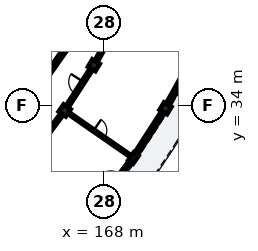
"""IFC4 building model, lengths in metres.
Left out: names, types, materials, properties, quantities, classifications, styles, units other than length and angle.
Written with IfcOpenShell. Run it as: python <this file> out.ifc"""

import sys

from ifc_helpers import new_model, si_unit, direction, frame, frame_2d, origin, origin_2d, place, context, subcontext, project, spatial, rectangle, extrude, element, fill, save


model = new_model("IFC4")
c1 = context("Model", 3, precision=1e-05, world=origin(), true_north=direction((0.0, 1.0)))
c2 = subcontext(c1, "Body", "Model", "MODEL_VIEW")
j1 = project(units=[si_unit("LENGTHUNIT", "METRE"), si_unit("PLANEANGLEUNIT", "RADIAN")], contexts=[c1])
p1 = place(None, origin())
s1 = spatial("IfcSite", under=j1, at=p1, CompositionType="ELEMENT")
p2 = place(p1, origin())
s2 = spatial("IfcBuilding", under=s1, at=p2, CompositionType="ELEMENT")
p3 = place(p2, frame((0.0, 0.0, 15.56)))
s3 = spatial("IfcBuildingStorey", under=s2, at=p3, CompositionType="ELEMENT", Elevation=15.56)
p4 = place(p3, frame((165.907, 38.366, 0.0), z_axis=(0.0, 0.0, 1.0), x_axis=(-0.573582112484, -0.819148069789, 0.0)))
e1 = element("IfcWall", 1, at=p4, inside=s3, PredefinedType="SHEAR", context=c2, shape_type="SweptSolid", body=[
    extrude(rectangle(XDim=3.42, YDim=0.25, at=frame_2d((1.71, 0.0))), origin(), (0.0, 0.0, 1.0), 3.11),
])
p5 = place(p3, frame((165.41, 33.692, 0.0), z_axis=(0.0, 0.0, 1.0), x_axis=(0.821646937942, -0.569996762596, 0.0)))
e2 = element("IfcColumn", 2, at=p5, inside=s3, PredefinedType="COLUMN", context=c2, shape_type="SweptSolid", body=[
    extrude(rectangle(XDim=0.56, YDim=0.56, at=origin_2d()), origin(), (0.0, 0.0, 1.0), 3.11),
])
p6 = place(p3, frame((169.929, 30.557, 0.0), z_axis=(0.0, 0.0, 1.0), x_axis=(0.821646937942, -0.569996762596, 0.0)))
e3 = element("IfcColumn", 3, at=p6, inside=s3, PredefinedType="PILASTER", context=c2, shape_type="SweptSolid", body=[
    extrude(rectangle(XDim=0.38, YDim=0.62, at=origin_2d()), origin(), (0.0, 0.0, 1.0), 3.11),
])
for number, where, z_axis, x_axis in (
    (4, (167.33, 36.662, 0.0), (0.0, 0.0, 1.0), (0.857, -0.515, 0.0)),
    (5, (172.044, 33.83, 0.0), (0.0, 0.0, 1.0), (0.857, -0.515, 0.0)),
):
    element("IfcColumn", number, at=place(p3, frame(where, z_axis=z_axis, x_axis=x_axis)), inside=s3, PredefinedType="COLUMN", context=c2, shape_type="SweptSolid", body=[
        extrude(rectangle(XDim=0.56, YDim=0.56, at=origin_2d()), origin(), (0.0, 0.0, 1.0), 3.11),
    ])
p7 = place(p3, frame((167.753, 27.63, 0.0), z_axis=(0.0, 0.0, 1.0), x_axis=(0.596611432616, 0.802530247699, 0.0)))
e6 = element("IfcWall", 6, at=p7, inside=s3, PredefinedType="SOLIDWALL", context=c2, shape_type="SweptSolid", body=[
    extrude(rectangle(XDim=3.487, YDim=0.24, at=frame_2d((1.743, 0.0))), origin(), (0.0, 0.0, 1.0), 2.355),
])
p8 = place(p7, frame((1.173, 0.0, 0.0)))
e7 = element("IfcOpeningElement", 7, at=p8, cuts=e6, PredefinedType="OPENING", context=c2, shape_type="SweptSolid", body=[
    extrude(rectangle(XDim=1.14, YDim=2.16, at=frame_2d((0.57, 1.08))), frame((0.0, 0.13, 0.0), z_axis=(0.0, -1.0, 0.0), x_axis=(1.0, 0.0, 0.0)), (0.0, 0.0, 1.0), 0.26),
])
p9 = place(p3, frame((170.016, 30.691, 0.0), z_axis=(0.0, 0.0, 1.0), x_axis=(0.542833164741, 0.839840553472, 0.0)))
e8 = element("IfcWall", 8, at=p9, inside=s3, PredefinedType="SOLIDWALL", context=c2, shape_type="SweptSolid", body=[
    extrude(rectangle(XDim=3.487, YDim=0.24, at=frame_2d((1.743, 0.0))), origin(), (0.0, 0.0, 1.0), 2.355),
])
p10 = place(p9, frame((1.104, 0.0, 0.55)))
e9 = element("IfcOpeningElement", 9, at=p10, cuts=e8, PredefinedType="OPENING", context=c2, shape_type="SweptSolid", body=[
    extrude(rectangle(XDim=1.28, YDim=1.52, at=frame_2d((0.64, 0.76))), frame((0.0, 0.13, 0.0), z_axis=(0.0, -1.0, 0.0), x_axis=(1.0, 0.0, 0.0)), (0.0, 0.0, 1.0), 0.26),
])
p11 = place(p3, frame((172.166, 34.048, 0.0), z_axis=(0.0, 0.0, 1.0), x_axis=(0.486706738221, 0.87356542455, 0.0)))
e10 = element("IfcWall", 10, at=p11, inside=s3, PredefinedType="SOLIDWALL", context=c2, shape_type="SweptSolid", body=[
    extrude(rectangle(XDim=3.487, YDim=0.24, at=frame_2d((1.743, 0.0))), origin(), (0.0, 0.0, 1.0), 2.355),
])
p12 = place(p11, frame((0.953, 0.0, 0.35)))
e11 = element("IfcOpeningElement", 11, at=p12, cuts=e10, PredefinedType="OPENING", context=c2, shape_type="SweptSolid", body=[
    extrude(rectangle(XDim=1.58, YDim=1.68, at=frame_2d((0.79, 0.84))), frame((0.0, 0.13, 0.0), z_axis=(0.0, -1.0, 0.0), x_axis=(1.0, 0.0, 0.0)), (0.0, 0.0, 1.0), 0.26),
])
p13 = place(p3, frame((163.509, 31.134, 0.0), z_axis=(0.0, 0.0, 1.0), x_axis=(0.596552136601, 0.802574325727, 0.0)))
e12 = element("IfcWall", 12, at=p13, inside=s3, PredefinedType="PARTITIONING", context=c2, shape_type="SweptSolid", body=[
    extrude(rectangle(XDim=2.837, YDim=0.195, at=frame_2d((1.418, 0.0))), origin(), (0.0, 0.0, 1.0), 2.37),
])
p14 = place(p13, frame((0.934, 0.0, 0.0)))
e13 = element("IfcOpeningElement", 13, at=p14, cuts=e12, PredefinedType="OPENING", context=c2, shape_type="SweptSolid", body=[
    extrude(rectangle(XDim=0.97, YDim=2.15, at=frame_2d((0.485, 1.075))), frame((0.0, 0.107, 0.0), z_axis=(0.0, -1.0, 0.0), x_axis=(1.0, 0.0, 0.0)), (0.0, 0.0, 1.0), 0.215),
])
p15 = place(p3, frame((165.739, 33.464, 0.0), z_axis=(0.0, 0.0, 1.0), x_axis=(0.821638260647, -0.570009270663, 0.0)))
e14 = element("IfcWall", 14, at=p15, inside=s3, PredefinedType="PARTITIONING", context=c2, shape_type="SweptSolid", body=[
    extrude(rectangle(XDim=4.7, YDim=0.125, at=frame_2d((2.35, 0.0))), origin(), (0.0, 0.0, 1.0), 2.37),
])
p16 = place(p15, frame((1.915, 0.0, 0.0)))
e15 = element("IfcOpeningElement", 15, at=p16, cuts=e14, PredefinedType="OPENING", context=c2, shape_type="SweptSolid", body=[
    extrude(rectangle(XDim=0.87, YDim=2.08, at=frame_2d((0.435, 1.04))), frame((0.0, 0.073, 0.0), z_axis=(0.0, -1.0, 0.0), x_axis=(1.0, 0.0, 0.0)), (0.0, 0.0, 1.0), 0.145),
])
p17 = place(p3, frame((165.6, 33.986, 0.0), z_axis=(0.0, 0.0, 1.0), x_axis=(0.542787304957, 0.83987019329, 0.0)))
e16 = element("IfcWall", 16, at=p17, inside=s3, PredefinedType="PARTITIONING", context=c2, shape_type="SweptSolid", body=[
    extrude(rectangle(XDim=2.837, YDim=0.195, at=frame_2d((1.418, 0.0))), origin(), (0.0, 0.0, 1.0), 2.37),
])
p18 = place(p17, frame((0.944, 0.0, 0.0)))
e17 = element("IfcOpeningElement", 17, at=p18, cuts=e16, PredefinedType="OPENING", context=c2, shape_type="SweptSolid", body=[
    extrude(rectangle(XDim=0.95, YDim=2.13, at=frame_2d((0.475, 1.065))), frame((0.0, 0.107, 0.0), z_axis=(0.0, -1.0, 0.0), x_axis=(1.0, 0.0, 0.0)), (0.0, 0.0, 1.0), 0.215),
])
p19 = place(p3, frame((167.5, 36.968, 0.0), z_axis=(0.0, 0.0, 1.0), x_axis=(0.48673124079, 0.8735517725, 0.0)))
e18 = element("IfcWall", 18, at=p19, inside=s3, PredefinedType="PARTITIONING", context=c2, shape_type="SweptSolid", body=[
    extrude(rectangle(XDim=2.837, YDim=0.195, at=frame_2d((1.418, 0.0))), origin(), (0.0, 0.0, 1.0), 2.37),
])
p20 = place(p19, frame((0.954, 0.0, 0.0)))
e19 = element("IfcOpeningElement", 19, at=p20, cuts=e18, PredefinedType="OPENING", context=c2, shape_type="SweptSolid", body=[
    extrude(rectangle(XDim=0.93, YDim=2.12, at=frame_2d((0.465, 1.06))), frame((0.0, 0.107, 0.0), z_axis=(0.0, -1.0, 0.0), x_axis=(1.0, 0.0, 0.0)), (0.0, 0.0, 1.0), 0.215),
])
p21 = place(p3, frame((169.407, 39.569, 0.0), z_axis=(0.0, 0.0, 1.0), x_axis=(0.889013002038, -0.457881952262, 0.0)))
e20 = element("IfcWall", 20, at=p21, inside=s3, PredefinedType="PLUMBINGWALL", context=c2, shape_type="SweptSolid", body=[
    extrude(rectangle(XDim=4.7, YDim=0.15, at=frame_2d((2.35, 0.0))), origin(), (0.0, 0.0, 1.0), 2.37),
])
p22 = place(p21, frame((1.925, 0.0, 0.0)))
e21 = element("IfcOpeningElement", 21, at=p22, cuts=e20, PredefinedType="OPENING", context=c2, shape_type="SweptSolid", body=[
    extrude(rectangle(XDim=0.85, YDim=2.05, at=frame_2d((0.425, 1.025))), frame((0.0, 0.085, 0.0), z_axis=(0.0, -1.0, 0.0), x_axis=(1.0, 0.0, 0.0)), (0.0, 0.0, 1.0), 0.17),
])
p23 = place(p10, origin())
e22 = element("IfcWindow", 22, at=p23, inside=s3, PartitioningType="SINGLE_PANEL", PredefinedType="WINDOW", context=c2, shape_type="SweptSolid", body=[
    extrude(rectangle(XDim=1.28, YDim=1.52, at=frame_2d((0.64, 0.76))), frame((0.0, 0.03, 0.0), z_axis=(0.0, -1.0, 0.0), x_axis=(1.0, 0.0, 0.0)), (0.0, 0.0, 1.0), 0.06),
])
fill(e9, e22)
p24 = place(p12, origin())
e23 = element("IfcWindow", 23, at=p24, inside=s3, PartitioningType="SINGLE_PANEL", PredefinedType="WINDOW", context=c2, shape_type="SweptSolid", body=[
    extrude(rectangle(XDim=1.58, YDim=1.68, at=frame_2d((0.79, 0.84))), frame((0.0, 0.03, 0.0), z_axis=(0.0, -1.0, 0.0), x_axis=(1.0, 0.0, 0.0)), (0.0, 0.0, 1.0), 0.06),
])
fill(e11, e23)
p25 = place(p14, origin())
e24 = element("IfcDoor", 24, at=p25, inside=s3, OperationType="SINGLE_SWING_LEFT", PredefinedType="DOOR", context=c2, shape_type="SweptSolid", body=[
    extrude(rectangle(XDim=0.97, YDim=2.15, at=frame_2d((0.485, 1.075))), frame((0.0, 0.025, 0.0), z_axis=(0.0, -1.0, 0.0), x_axis=(1.0, 0.0, 0.0)), (0.0, 0.0, 1.0), 0.05),
])
fill(e13, e24)
p26 = place(p16, origin())
e25 = element("IfcDoor", 25, at=p26, inside=s3, OperationType="SINGLE_SWING_LEFT", PredefinedType="DOOR", context=c2, shape_type="SweptSolid", body=[
    extrude(rectangle(XDim=0.87, YDim=2.08, at=frame_2d((0.435, 1.04))), frame((0.0, 0.025, 0.0), z_axis=(0.0, -1.0, 0.0), x_axis=(1.0, 0.0, 0.0)), (0.0, 0.0, 1.0), 0.05),
])
fill(e15, e25)
p27 = place(p18, origin())
e26 = element("IfcDoor", 26, at=p27, inside=s3, OperationType="SINGLE_SWING_RIGHT", PredefinedType="DOOR", context=c2, shape_type="SweptSolid", body=[
    extrude(rectangle(XDim=0.95, YDim=2.13, at=frame_2d((0.475, 1.065))), frame((0.0, 0.025, 0.0), z_axis=(0.0, -1.0, 0.0), x_axis=(1.0, 0.0, 0.0)), (0.0, 0.0, 1.0), 0.05),
])
fill(e17, e26)
save(model, sys.argv[1])
